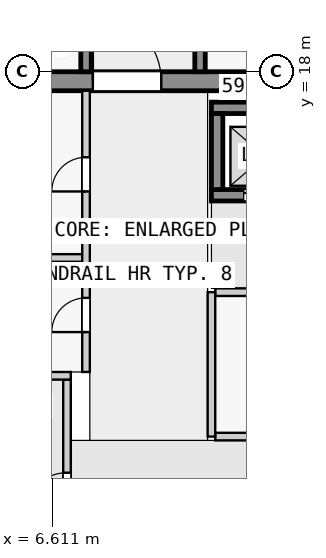
"""IFC4 building model, lengths in metres.
Left out: names, types, materials, properties, quantities, classifications, styles, units other than length and angle.
Written with IfcOpenShell. Run it as: python <this file> out.ifc"""

import sys

from ifc_helpers import new_model, si_unit, direction, frame, frame_2d, origin, place, context, subcontext, project, spatial, rectangle, extrude, element, fill, save


model = new_model("IFC4")
c1 = context("Model", 3, precision=1e-05, world=origin(), true_north=direction((0.0, 1.0)))
c2 = subcontext(c1, "Body", "Model", "MODEL_VIEW")
j1 = project(units=[si_unit("LENGTHUNIT", "METRE"), si_unit("PLANEANGLEUNIT", "RADIAN")], contexts=[c1])
p1 = place(None, origin())
s1 = spatial("IfcSite", under=j1, at=p1, CompositionType="ELEMENT")
p2 = place(p1, origin())
s2 = spatial("IfcBuilding", under=s1, at=p2, CompositionType="ELEMENT")
p3 = place(p2, frame((0.0, 0.0, 225.9)))
s3 = spatial("IfcBuildingStorey", under=s2, at=p3, CompositionType="ELEMENT", Elevation=225.9)
p4 = place(p3, frame((1.38, 17.75, 0.0), z_axis=(0.0, 0.0, 1.0), x_axis=(1.0, 0.0, 0.0)))
e1 = element("IfcWall", 1, at=p4, inside=s3, PredefinedType="SHEAR", context=c2, shape_type="SweptSolid", body=[
    extrude(rectangle(XDim=21.12, YDim=0.5, at=frame_2d((10.56, 0.0))), origin(), (0.0, 0.0, 1.0), 3.05),
])
p5 = place(p4, frame((6.3, 0.0, 0.0)))
e2 = element("IfcOpeningElement", 2, at=p5, cuts=e1, PredefinedType="OPENING", context=c2, shape_type="SweptSolid", body=[
    extrude(rectangle(XDim=1.8, YDim=2.1, at=frame_2d((0.9, 1.05))), frame((0.0, 0.26, 0.0), z_axis=(0.0, -1.0, 0.0), x_axis=(1.0, 0.0, 0.0)), (0.0, 0.0, 1.0), 0.52),
])
p6 = place(p3, frame((10.8, 17.05, 0.0), z_axis=(0.0, 0.0, 1.0), x_axis=(1.0, 0.0, 0.0)))
e3 = element("IfcWall", 3, at=p6, inside=s3, PredefinedType="SHEAR", context=c2, shape_type="SweptSolid", body=[
    extrude(rectangle(XDim=7.8, YDim=0.3, at=frame_2d((3.9, 0.0))), origin(), (0.0, 0.0, 1.0), 3.05),
])
p7 = place(p3, frame((10.8, 14.75, 0.0), z_axis=(0.0, 0.0, 1.0), x_axis=(1.0, 0.0, 0.0)))
e4 = element("IfcWall", 4, at=p7, inside=s3, PredefinedType="SHEAR", context=c2, shape_type="SweptSolid", body=[
    extrude(rectangle(XDim=7.8, YDim=0.3, at=frame_2d((3.9, 0.0))), origin(), (0.0, 0.0, 1.0), 3.05),
])
p8 = place(p7, frame((0.85, 0.0, 0.0)))
e5 = element("IfcOpeningElement", 5, at=p8, cuts=e4, PredefinedType="OPENING", context=c2, shape_type="SweptSolid", body=[
    extrude(rectangle(XDim=1.1, YDim=2.1, at=frame_2d((0.55, 1.05))), frame((0.0, 0.16, 0.0), z_axis=(0.0, -1.0, 0.0), x_axis=(1.0, 0.0, 0.0)), (0.0, 0.0, 1.0), 0.32),
])
p9 = place(p7, frame((3.35, 0.0, 0.0)))
e6 = element("IfcOpeningElement", 6, at=p9, cuts=e4, PredefinedType="OPENING", context=c2, shape_type="SweptSolid", body=[
    extrude(rectangle(XDim=1.1, YDim=2.1, at=frame_2d((0.55, 1.05))), frame((0.0, 0.16, 0.0), z_axis=(0.0, -1.0, 0.0), x_axis=(1.0, 0.0, 0.0)), (0.0, 0.0, 1.0), 0.32),
])
p10 = place(p7, frame((5.85, 0.0, 0.0)))
e7 = element("IfcOpeningElement", 7, at=p10, cuts=e4, PredefinedType="OPENING", context=c2, shape_type="SweptSolid", body=[
    extrude(rectangle(XDim=1.1, YDim=2.1, at=frame_2d((0.55, 1.05))), frame((0.0, 0.16, 0.0), z_axis=(0.0, -1.0, 0.0), x_axis=(1.0, 0.0, 0.0)), (0.0, 0.0, 1.0), 0.32),
])
p11 = place(p3, frame((10.95, 14.9, 0.0), z_axis=(0.0, 0.0, 1.0), x_axis=(0.0, 1.0, 0.0)))
e8 = element("IfcWall", 8, at=p11, inside=s3, PredefinedType="SHEAR", context=c2, shape_type="SweptSolid", body=[
    extrude(rectangle(XDim=2.0, YDim=0.3, at=frame_2d((1.0, 0.0))), origin(), (0.0, 0.0, 1.0), 3.05),
])
p12 = place(p3, frame((7.5, 18.0, 0.0), z_axis=(0.0, 0.0, 1.0), x_axis=(0.0, 1.0, 0.0)))
e9 = element("IfcWall", 9, at=p12, inside=s3, PredefinedType="SHEAR", context=c2, shape_type="SweptSolid", body=[
    extrude(rectangle(XDim=27.0, YDim=0.275, at=frame_2d((13.5, 0.0))), origin(), (0.0, 0.0, 1.0), 3.05),
])
p13 = place(p12, frame((1.75, 0.0, 0.0)))
e10 = element("IfcOpeningElement", 10, at=p13, cuts=e9, PredefinedType="OPENING", context=c2, shape_type="SweptSolid", body=[
    extrude(rectangle(XDim=1.0, YDim=2.1, at=frame_2d((0.5, 1.05))), frame((0.0, 0.147, 0.0), z_axis=(0.0, -1.0, 0.0), x_axis=(1.0, 0.0, 0.0)), (0.0, 0.0, 1.0), 0.295),
])
p14 = place(p12, frame((8.55, 0.0, 0.0)))
e11 = element("IfcOpeningElement", 11, at=p14, cuts=e9, PredefinedType="OPENING", context=c2, shape_type="SweptSolid", body=[
    extrude(rectangle(XDim=1.0, YDim=2.1, at=frame_2d((0.5, 1.05))), frame((0.0, 0.147, 0.0), z_axis=(0.0, -1.0, 0.0), x_axis=(1.0, 0.0, 0.0)), (0.0, 0.0, 1.0), 0.295),
])
p15 = place(p12, frame((17.55, 0.0, 0.0)))
e12 = element("IfcOpeningElement", 12, at=p15, cuts=e9, PredefinedType="OPENING", context=c2, shape_type="SweptSolid", body=[
    extrude(rectangle(XDim=1.0, YDim=2.1, at=frame_2d((0.5, 1.05))), frame((0.0, 0.147, 0.0), z_axis=(0.0, -1.0, 0.0), x_axis=(1.0, 0.0, 0.0)), (0.0, 0.0, 1.0), 0.295),
])
p16 = place(p12, frame((23.25, 0.0, 0.0)))
e13 = element("IfcOpeningElement", 13, at=p16, cuts=e9, PredefinedType="OPENING", context=c2, shape_type="SweptSolid", body=[
    extrude(rectangle(XDim=0.9, YDim=2.1, at=frame_2d((0.45, 1.05))), frame((0.0, 0.147, 0.0), z_axis=(0.0, -1.0, 0.0), x_axis=(1.0, 0.0, 0.0)), (0.0, 0.0, 1.0), 0.295),
])
p17 = place(p12, frame((25.45, 0.0, 0.0)))
e14 = element("IfcOpeningElement", 14, at=p17, cuts=e9, PredefinedType="OPENING", context=c2, shape_type="SweptSolid", body=[
    extrude(rectangle(XDim=1.0, YDim=2.1, at=frame_2d((0.5, 1.05))), frame((0.0, 0.147, 0.0), z_axis=(0.0, -1.0, 0.0), x_axis=(1.0, 0.0, 0.0)), (0.0, 0.0, 1.0), 0.295),
])
p18 = place(p3, frame((10.5, 18.0, 0.0), z_axis=(0.0, 0.0, 1.0), x_axis=(0.0, 1.0, 0.0)))
e15 = element("IfcWall", 15, at=p18, inside=s3, PredefinedType="SHEAR", context=c2, shape_type="SweptSolid", body=[
    extrude(rectangle(XDim=27.0, YDim=0.275, at=frame_2d((13.5, 0.0))), origin(), (0.0, 0.0, 1.0), 3.05),
])
p19 = place(p18, frame((4.05, 0.0, 0.0)))
e16 = element("IfcOpeningElement", 16, at=p19, cuts=e15, PredefinedType="OPENING", context=c2, shape_type="SweptSolid", body=[
    extrude(rectangle(XDim=1.0, YDim=2.1, at=frame_2d((0.5, 1.05))), frame((0.0, 0.147, 0.0), z_axis=(0.0, -1.0, 0.0), x_axis=(1.0, 0.0, 0.0)), (0.0, 0.0, 1.0), 0.295),
])
p20 = place(p18, frame((10.35, 0.0, 0.0)))
e17 = element("IfcOpeningElement", 17, at=p20, cuts=e15, PredefinedType="OPENING", context=c2, shape_type="SweptSolid", body=[
    extrude(rectangle(XDim=1.8, YDim=2.1, at=frame_2d((0.9, 1.05))), frame((0.0, 0.147, 0.0), z_axis=(0.0, -1.0, 0.0), x_axis=(1.0, 0.0, 0.0)), (0.0, 0.0, 1.0), 0.295),
])
p21 = place(p18, frame((15.25, 0.0, 0.0)))
e18 = element("IfcOpeningElement", 18, at=p21, cuts=e15, PredefinedType="OPENING", context=c2, shape_type="SweptSolid", body=[
    extrude(rectangle(XDim=1.0, YDim=2.1, at=frame_2d((0.5, 1.05))), frame((0.0, 0.147, 0.0), z_axis=(0.0, -1.0, 0.0), x_axis=(1.0, 0.0, 0.0)), (0.0, 0.0, 1.0), 0.295),
])
p22 = place(p18, frame((21.35, 0.0, 0.0)))
e19 = element("IfcOpeningElement", 19, at=p22, cuts=e15, PredefinedType="OPENING", context=c2, shape_type="SweptSolid", body=[
    extrude(rectangle(XDim=1.0, YDim=2.1, at=frame_2d((0.5, 1.05))), frame((0.0, 0.147, 0.0), z_axis=(0.0, -1.0, 0.0), x_axis=(1.0, 0.0, 0.0)), (0.0, 0.0, 1.0), 0.295),
])
p23 = place(p3, frame((7.0, 5.9, 0.0), z_axis=(0.0, 0.0, 1.0), x_axis=(0.0, 1.0, 0.0)))
e20 = element("IfcWall", 20, at=p23, inside=s3, PredefinedType="PARTITIONING", context=c2, shape_type="SweptSolid", body=[
    extrude(rectangle(XDim=4.0, YDim=0.2, at=frame_2d((2.0, 0.0))), origin(), (0.0, 0.0, 1.0), 3.05),
])
p24 = place(p23, frame((0.45, 0.0, 0.0)))
e21 = element("IfcOpeningElement", 21, at=p24, cuts=e20, PredefinedType="OPENING", context=c2, shape_type="SweptSolid", body=[
    extrude(rectangle(XDim=1.1, YDim=2.1, at=frame_2d((0.55, 1.05))), frame((0.0, 0.11, 0.0), z_axis=(0.0, -1.0, 0.0), x_axis=(1.0, 0.0, 0.0)), (0.0, 0.0, 1.0), 0.22),
])
p25 = place(p3, frame((5.15, 10.0, 0.0), z_axis=(0.0, 0.0, 1.0), x_axis=(1.0, 0.0, 0.0)))
e22 = element("IfcWall", 22, at=p25, inside=s3, PredefinedType="PARTITIONING", context=c2, shape_type="SweptSolid", body=[
    extrude(rectangle(XDim=1.95, YDim=0.2, at=frame_2d((0.975, 0.0))), origin(), (0.0, 0.0, 1.0), 3.05),
])
p26 = place(p3, frame((10.8, 8.4, 0.0), z_axis=(0.0, 0.0, 1.0), x_axis=(0.0, 1.0, 0.0)))
e23 = element("IfcWall", 23, at=p26, inside=s3, PredefinedType="PARTITIONING", context=c2, shape_type="SweptSolid", body=[
    extrude(rectangle(XDim=3.8, YDim=0.2, at=frame_2d((1.9, 0.0))), origin(), (0.0, 0.0, 1.0), 3.05),
])
p27 = place(p3, frame((10.9, 8.4, 0.0), z_axis=(0.0, 0.0, 1.0), x_axis=(1.0, 0.0, 0.0)))
e24 = element("IfcWall", 24, at=p27, inside=s3, PredefinedType="PARTITIONING", context=c2, shape_type="SweptSolid", body=[
    extrude(rectangle(XDim=8.6, YDim=0.2, at=frame_2d((4.3, 0.0))), origin(), (0.0, 0.0, 1.0), 3.05),
])
p28 = place(p3, frame((10.9, 12.2, 0.0), z_axis=(0.0, 0.0, 1.0), x_axis=(1.0, 0.0, 0.0)))
e25 = element("IfcWall", 25, at=p28, inside=s3, PredefinedType="PARTITIONING", context=c2, shape_type="SweptSolid", body=[
    extrude(rectangle(XDim=8.6, YDim=0.2, at=frame_2d((4.3, 0.0))), origin(), (0.0, 0.0, 1.0), 3.05),
])
p29 = place(p28, frame((1.425, 0.0, 0.0)))
e26 = element("IfcOpeningElement", 26, at=p29, cuts=e25, PredefinedType="OPENING", context=c2, shape_type="SweptSolid", body=[
    extrude(rectangle(XDim=0.9, YDim=2.1, at=frame_2d((0.45, 1.05))), frame((0.0, 0.11, 0.0), z_axis=(0.0, -1.0, 0.0), x_axis=(1.0, 0.0, 0.0)), (0.0, 0.0, 1.0), 0.22),
])
p30 = place(p28, frame((5.825, 0.0, 0.0)))
e27 = element("IfcOpeningElement", 27, at=p30, cuts=e25, PredefinedType="OPENING", context=c2, shape_type="SweptSolid", body=[
    extrude(rectangle(XDim=0.9, YDim=2.1, at=frame_2d((0.45, 1.05))), frame((0.0, 0.11, 0.0), z_axis=(0.0, -1.0, 0.0), x_axis=(1.0, 0.0, 0.0)), (0.0, 0.0, 1.0), 0.22),
])
p31 = place(p3, frame((7.5, 10.1, 0.0), z_axis=(0.0, 0.0, 1.0), x_axis=(0.0, 1.0, 0.0)))
e28 = element("IfcWall", 28, at=p31, inside=s3, PredefinedType="PARTITIONING", context=c2, shape_type="SweptSolid", body=[
    extrude(rectangle(XDim=7.4, YDim=0.2, at=frame_2d((3.7, 0.0))), origin(), (0.0, 0.0, 1.0), 3.05),
])
p32 = place(p31, frame((1.05, 0.0, 0.0)))
e29 = element("IfcOpeningElement", 29, at=p32, cuts=e28, PredefinedType="OPENING", context=c2, shape_type="SweptSolid", body=[
    extrude(rectangle(XDim=0.9, YDim=2.1, at=frame_2d((0.45, 1.05))), frame((0.0, 0.11, 0.0), z_axis=(0.0, -1.0, 0.0), x_axis=(1.0, 0.0, 0.0)), (0.0, 0.0, 1.0), 0.22),
])
p33 = place(p31, frame((4.75, 0.0, 0.0)))
e30 = element("IfcOpeningElement", 30, at=p33, cuts=e28, PredefinedType="OPENING", context=c2, shape_type="SweptSolid", body=[
    extrude(rectangle(XDim=0.9, YDim=2.1, at=frame_2d((0.45, 1.05))), frame((0.0, 0.11, 0.0), z_axis=(0.0, -1.0, 0.0), x_axis=(1.0, 0.0, 0.0)), (0.0, 0.0, 1.0), 0.22),
])
p34 = place(p3, frame((5.15, 13.1, 0.0), z_axis=(0.0, 0.0, 1.0), x_axis=(1.0, 0.0, 0.0)))
e31 = element("IfcWall", 31, at=p34, inside=s3, PredefinedType="PARTITIONING", context=c2, shape_type="SweptSolid", body=[
    extrude(rectangle(XDim=2.25, YDim=0.2, at=frame_2d((1.125, 0.0))), origin(), (0.0, 0.0, 1.0), 3.05),
])
p35 = place(p24, origin())
e32 = element("IfcDoor", 32, at=p35, inside=s3, OperationType="SINGLE_SWING_LEFT", PredefinedType="DOOR", context=c2, shape_type="SweptSolid", body=[
    extrude(rectangle(XDim=1.1, YDim=2.1, at=frame_2d((0.55, 1.05))), frame((0.0, 0.025, 0.0), z_axis=(0.0, -1.0, 0.0), x_axis=(1.0, 0.0, 0.0)), (0.0, 0.0, 1.0), 0.05),
])
fill(e21, e32)
p36 = place(p8, origin())
e33 = element("IfcDoor", 33, at=p36, inside=s3, OperationType="DOUBLE_DOOR_SLIDING", PredefinedType="DOOR", context=c2, shape_type="SweptSolid", body=[
    extrude(rectangle(XDim=1.1, YDim=2.1, at=frame_2d((0.55, 1.05))), frame((0.0, 0.025, 0.0), z_axis=(0.0, -1.0, 0.0), x_axis=(1.0, 0.0, 0.0)), (0.0, 0.0, 1.0), 0.05),
])
fill(e5, e33)
p37 = place(p5, origin())
e34 = element("IfcDoor", 34, at=p37, inside=s3, OperationType="DOUBLE_DOOR_SINGLE_SWING", PredefinedType="DOOR", context=c2, shape_type="SweptSolid", body=[
    extrude(rectangle(XDim=1.8, YDim=2.1, at=frame_2d((0.9, 1.05))), frame((0.0, 0.025, 0.0), z_axis=(0.0, -1.0, 0.0), x_axis=(1.0, 0.0, 0.0)), (0.0, 0.0, 1.0), 0.05),
])
fill(e2, e34)
p38 = place(p32, origin())
e35 = element("IfcDoor", 35, at=p38, inside=s3, OperationType="SINGLE_SWING_RIGHT", PredefinedType="DOOR", context=c2, shape_type="SweptSolid", body=[
    extrude(rectangle(XDim=0.9, YDim=2.1, at=frame_2d((0.45, 1.05))), frame((0.0, 0.025, 0.0), z_axis=(0.0, -1.0, 0.0), x_axis=(1.0, 0.0, 0.0)), (0.0, 0.0, 1.0), 0.05),
])
fill(e29, e35)
p39 = place(p33, origin())
e36 = element("IfcDoor", 36, at=p39, inside=s3, OperationType="SINGLE_SWING_RIGHT", PredefinedType="DOOR", context=c2, shape_type="SweptSolid", body=[
    extrude(rectangle(XDim=0.9, YDim=2.1, at=frame_2d((0.45, 1.05))), frame((0.0, 0.025, 0.0), z_axis=(0.0, -1.0, 0.0), x_axis=(1.0, 0.0, 0.0)), (0.0, 0.0, 1.0), 0.05),
])
fill(e30, e36)
save(model, sys.argv[1])
